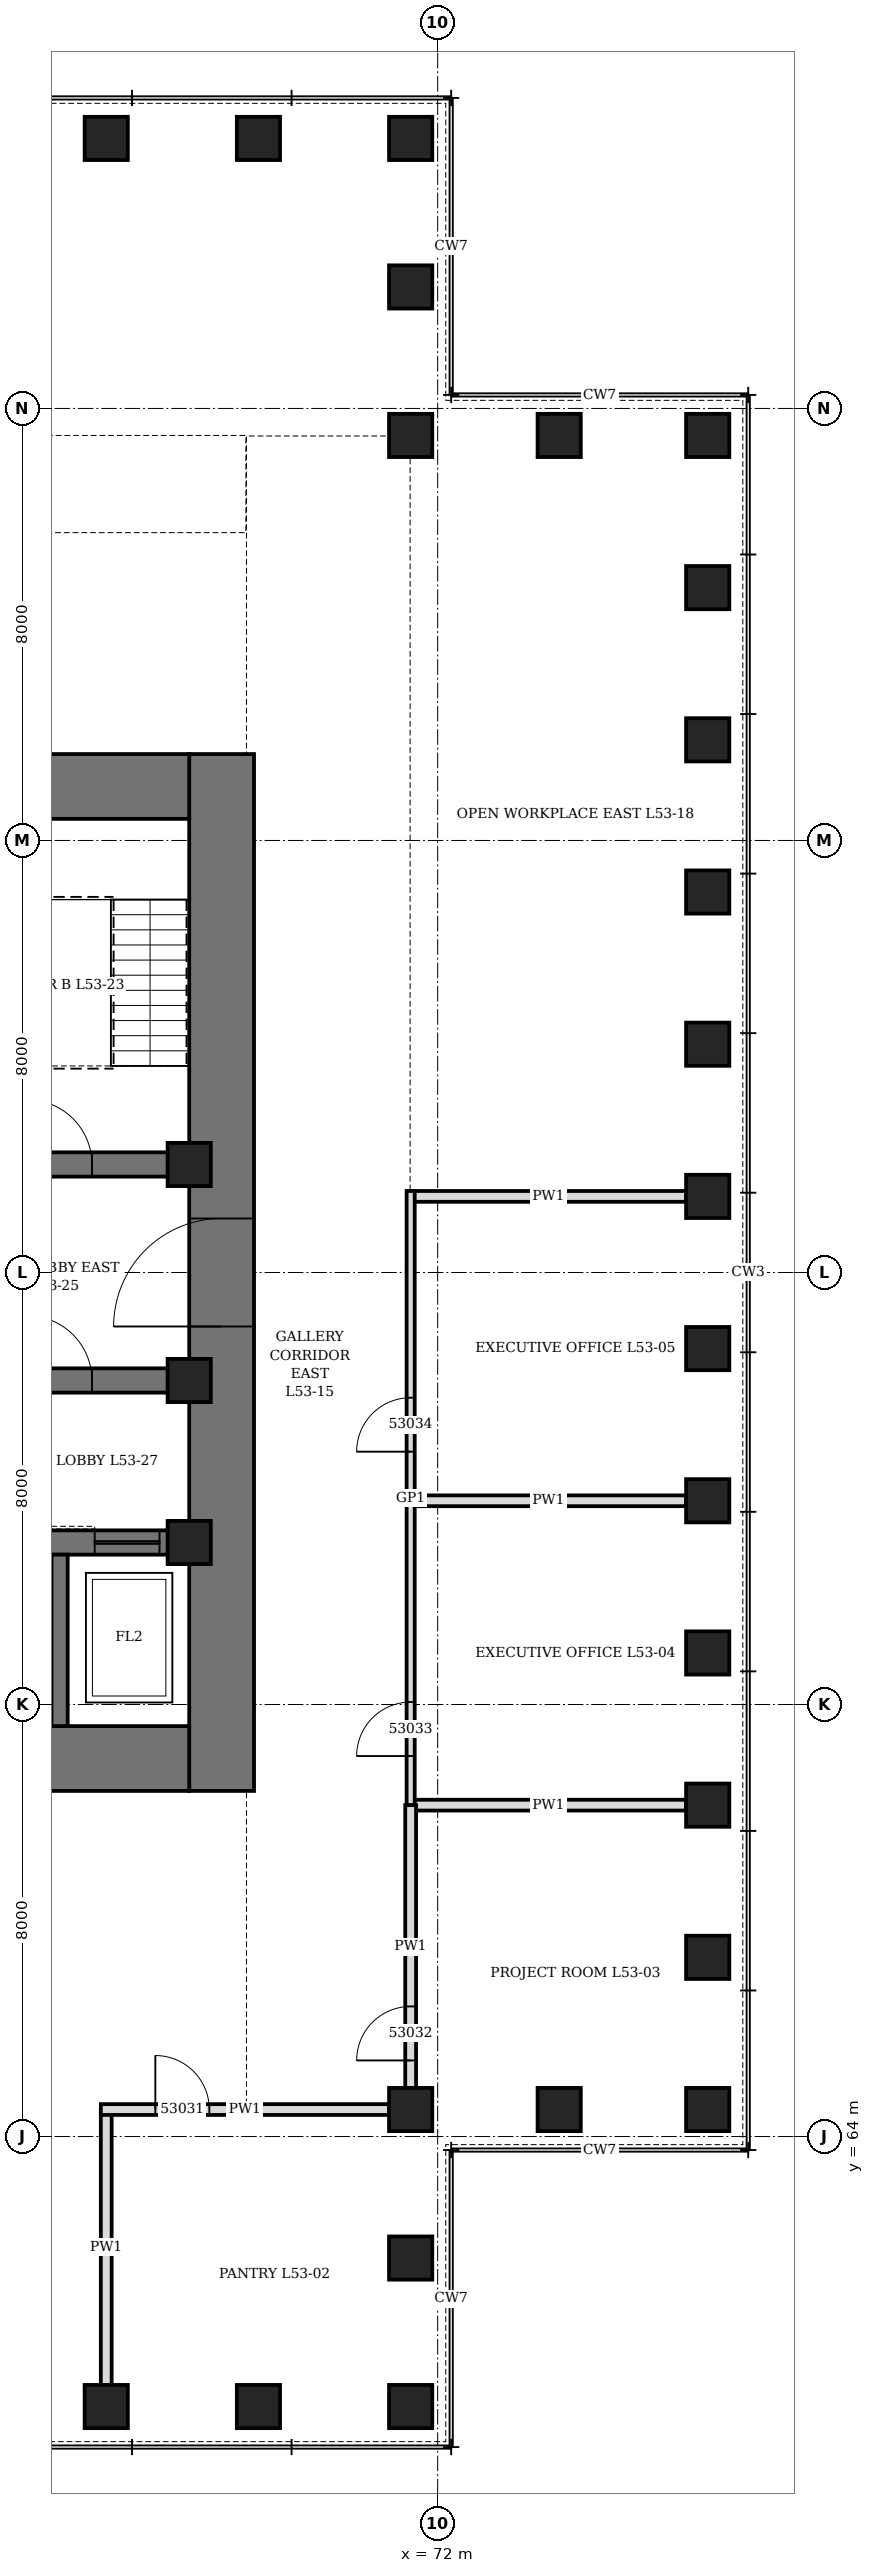
"""IFC4 building model, lengths in metres.
Left out: names, types, materials, properties, quantities, classifications, styles, units other than length and angle.
Written with IfcOpenShell. Run it as: python <this file> out.ifc"""

import sys

from ifc_helpers import new_model, si_unit, direction, frame, frame_2d, origin, origin_2d, place, context, subcontext, project, spatial, rectangle, hollow_rectangle, extrude, element, fill, save


model = new_model("IFC4")
c1 = context("Model", 3, precision=1e-05, world=origin(), true_north=direction((0.0, 1.0)))
c2 = subcontext(c1, "Body", "Model", "MODEL_VIEW")
j1 = project(units=[si_unit("LENGTHUNIT", "METRE"), si_unit("PLANEANGLEUNIT", "RADIAN")], contexts=[c1])
p1 = place(None, origin())
s1 = spatial("IfcSite", under=j1, at=p1, CompositionType="ELEMENT")
p2 = place(p1, origin())
s2 = spatial("IfcBuilding", under=s1, at=p2, CompositionType="ELEMENT")
p3 = place(p2, frame((0.0, 0.0, 235.9)))
s3 = spatial("IfcBuildingStorey", under=s2, at=p3, CompositionType="ELEMENT", Elevation=235.9)
for number, where, z_axis, x_axis in (
    (1, (65.864, 59.0, 0.0), (0.0, 0.0, 1.0), (1.0, 0.0, 0.0)),
    (2, (68.682, 59.0, 0.0), (0.0, 0.0, 1.0), (1.0, 0.0, 0.0)),
    (3, (71.5, 59.0, 0.0), (0.0, 0.0, 1.0), (0.0, 1.0, 0.0)),
    (4, (71.5, 61.75, 0.0), (0.0, 0.0, 1.0), (0.0, 1.0, 0.0)),
    (5, (71.5, 64.5, 0.0), (0.0, 0.0, 1.0), (1.0, 0.0, 0.0)),
    (6, (74.25, 64.5, 0.0), (0.0, 0.0, 1.0), (1.0, 0.0, 0.0)),
    (7, (77.0, 64.5, 0.0), (0.0, 0.0, 1.0), (0.0, 1.0, 0.0)),
    (8, (77.0, 67.318, 0.0), (0.0, 0.0, 1.0), (0.0, 1.0, 0.0)),
    (9, (77.0, 70.136, 0.0), (0.0, 0.0, 1.0), (0.0, 1.0, 0.0)),
    (10, (77.0, 72.955, 0.0), (0.0, 0.0, 1.0), (0.0, 1.0, 0.0)),
    (11, (77.0, 75.773, 0.0), (0.0, 0.0, 1.0), (0.0, 1.0, 0.0)),
    (12, (77.0, 78.591, 0.0), (0.0, 0.0, 1.0), (0.0, 1.0, 0.0)),
    (13, (77.0, 81.409, 0.0), (0.0, 0.0, 1.0), (0.0, 1.0, 0.0)),
    (14, (77.0, 84.227, 0.0), (0.0, 0.0, 1.0), (0.0, 1.0, 0.0)),
    (15, (77.0, 87.045, 0.0), (0.0, 0.0, 1.0), (0.0, 1.0, 0.0)),
    (16, (77.0, 89.864, 0.0), (0.0, 0.0, 1.0), (0.0, 1.0, 0.0)),
    (17, (77.0, 92.682, 0.0), (0.0, 0.0, 1.0), (0.0, 1.0, 0.0)),
    (18, (77.0, 95.5, 0.0), (0.0, 0.0, 1.0), (1.0, 0.0, 0.0)),
    (19, (74.25, 95.5, 0.0), (0.0, 0.0, 1.0), (1.0, 0.0, 0.0)),
    (20, (71.5, 95.5, 0.0), (0.0, 0.0, 1.0), (0.0, 1.0, 0.0)),
    (21, (71.5, 98.25, 0.0), (0.0, 0.0, 1.0), (0.0, 1.0, 0.0)),
    (22, (71.5, 101.0, 0.0), (0.0, 0.0, 1.0), (1.0, 0.0, 0.0)),
    (23, (68.682, 101.0, 0.0), (0.0, 0.0, 1.0), (1.0, 0.0, 0.0)),
    (24, (65.864, 101.0, 0.0), (0.0, 0.0, 1.0), (1.0, 0.0, 0.0)),
):
    element("IfcColumn", number, at=place(p3, frame(where, z_axis=z_axis, x_axis=x_axis)), inside=s3, PredefinedType="COLUMN", context=c2, shape_type="SweptSolid", body=[
        extrude(hollow_rectangle(XDim=0.8, YDim=0.8, WallThickness=0.08, at=origin_2d()), origin(), (0.0, 0.0, 1.0), 4.2),
    ])
p4 = place(p3, frame((68.0, 70.4, 0.0), z_axis=(0.0, 0.0, 1.0), x_axis=(0.0, 1.0, 0.0)))
e25 = element("IfcWall", 25, at=p4, inside=s3, PredefinedType="SHEAR", context=c2, shape_type="SweptSolid", body=[
    extrude(rectangle(XDim=19.2, YDim=1.2, at=frame_2d((9.6, 0.0))), origin(), (0.0, 0.0, 1.0), 4.2),
])
p5 = place(p4, frame((8.6, 0.0, 0.0)))
e26 = element("IfcOpeningElement", 26, at=p5, cuts=e25, PredefinedType="OPENING", context=c2, shape_type="SweptSolid", body=[
    extrude(rectangle(XDim=2.0, YDim=2.4, at=frame_2d((1.0, 1.2))), frame((0.0, 0.61, 0.0), z_axis=(0.0, -1.0, 0.0), x_axis=(1.0, 0.0, 0.0)), (0.0, 0.0, 1.0), 1.22),
])
p6 = place(p3, frame((44.6, 71.0, 0.0), z_axis=(0.0, 0.0, 1.0), x_axis=(1.0, 0.0, 0.0)))
e27 = element("IfcWall", 27, at=p6, inside=s3, PredefinedType="SHEAR", context=c2, shape_type="SweptSolid", body=[
    extrude(rectangle(XDim=22.8, YDim=1.2, at=frame_2d((11.4, 0.0))), origin(), (0.0, 0.0, 1.0), 4.2),
])
p7 = place(p6, frame((6.35, 0.0, 0.0)))
e28 = element("IfcOpeningElement", 28, at=p7, cuts=e27, PredefinedType="OPENING", context=c2, shape_type="SweptSolid", body=[
    extrude(rectangle(XDim=1.1, YDim=2.2, at=frame_2d((0.55, 1.1))), frame((0.0, 0.61, 0.0), z_axis=(0.0, -1.0, 0.0), x_axis=(1.0, 0.0, 0.0)), (0.0, 0.0, 1.0), 1.22),
])
p8 = place(p6, frame((9.35, 0.0, 0.0)))
e29 = element("IfcOpeningElement", 29, at=p8, cuts=e27, PredefinedType="OPENING", context=c2, shape_type="SweptSolid", body=[
    extrude(rectangle(XDim=1.1, YDim=2.2, at=frame_2d((0.55, 1.1))), frame((0.0, 0.61, 0.0), z_axis=(0.0, -1.0, 0.0), x_axis=(1.0, 0.0, 0.0)), (0.0, 0.0, 1.0), 1.22),
])
p9 = place(p6, frame((12.35, 0.0, 0.0)))
e30 = element("IfcOpeningElement", 30, at=p9, cuts=e27, PredefinedType="OPENING", context=c2, shape_type="SweptSolid", body=[
    extrude(rectangle(XDim=1.1, YDim=2.2, at=frame_2d((0.55, 1.1))), frame((0.0, 0.61, 0.0), z_axis=(0.0, -1.0, 0.0), x_axis=(1.0, 0.0, 0.0)), (0.0, 0.0, 1.0), 1.22),
])
p10 = place(p6, frame((15.35, 0.0, 0.0)))
e31 = element("IfcOpeningElement", 31, at=p10, cuts=e27, PredefinedType="OPENING", context=c2, shape_type="SweptSolid", body=[
    extrude(rectangle(XDim=1.1, YDim=2.2, at=frame_2d((0.55, 1.1))), frame((0.0, 0.61, 0.0), z_axis=(0.0, -1.0, 0.0), x_axis=(1.0, 0.0, 0.0)), (0.0, 0.0, 1.0), 1.22),
])
p11 = place(p3, frame((44.6, 89.0, 0.0), z_axis=(0.0, 0.0, 1.0), x_axis=(1.0, 0.0, 0.0)))
e32 = element("IfcWall", 32, at=p11, inside=s3, PredefinedType="SHEAR", context=c2, shape_type="SweptSolid", body=[
    extrude(rectangle(XDim=22.8, YDim=1.2, at=frame_2d((11.4, 0.0))), origin(), (0.0, 0.0, 1.0), 4.2),
])
p12 = place(p11, frame((9.275, 0.0, 0.0)))
e33 = element("IfcOpeningElement", 33, at=p12, cuts=e32, PredefinedType="OPENING", context=c2, shape_type="SweptSolid", body=[
    extrude(rectangle(XDim=1.0, YDim=2.1, at=frame_2d((0.5, 1.05))), frame((0.0, 0.61, 0.0), z_axis=(0.0, -1.0, 0.0), x_axis=(1.0, 0.0, 0.0)), (0.0, 0.0, 1.0), 1.22),
])
p13 = place(p11, frame((6.45, 0.0, 0.0)))
e34 = element("IfcOpeningElement", 34, at=p13, cuts=e32, PredefinedType="OPENING", context=c2, shape_type="SweptSolid", body=[
    extrude(rectangle(XDim=0.9, YDim=2.1, at=frame_2d((0.45, 1.05))), frame((0.0, 0.61, 0.0), z_axis=(0.0, -1.0, 0.0), x_axis=(1.0, 0.0, 0.0)), (0.0, 0.0, 1.0), 1.22),
])
p14 = place(p11, frame((12.025, 0.0, 0.0)))
e35 = element("IfcOpeningElement", 35, at=p14, cuts=e32, PredefinedType="OPENING", context=c2, shape_type="SweptSolid", body=[
    extrude(rectangle(XDim=0.9, YDim=2.1, at=frame_2d((0.45, 1.05))), frame((0.0, 0.61, 0.0), z_axis=(0.0, -1.0, 0.0), x_axis=(1.0, 0.0, 0.0)), (0.0, 0.0, 1.0), 1.22),
])
p15 = place(p11, frame((13.962, 0.0, 0.0)))
e36 = element("IfcOpeningElement", 36, at=p15, cuts=e32, PredefinedType="OPENING", context=c2, shape_type="SweptSolid", body=[
    extrude(rectangle(XDim=0.9, YDim=2.1, at=frame_2d((0.45, 1.05))), frame((0.0, 0.61, 0.0), z_axis=(0.0, -1.0, 0.0), x_axis=(1.0, 0.0, 0.0)), (0.0, 0.0, 1.0), 1.22),
])
p16 = place(p3, frame((62.225, 75.0, 0.0), z_axis=(0.0, 0.0, 1.0), x_axis=(1.0, 0.0, 0.0)))
e37 = element("IfcWall", 37, at=p16, inside=s3, PredefinedType="SHEAR", context=c2, shape_type="SweptSolid", body=[
    extrude(rectangle(XDim=5.175, YDim=0.45, at=frame_2d((2.587, 0.0))), origin(), (0.0, 0.0, 1.0), 4.2),
])
p17 = place(p16, frame((0.675, 0.0, 0.0)))
e38 = element("IfcOpeningElement", 38, at=p17, cuts=e37, PredefinedType="OPENING", context=c2, shape_type="SweptSolid", body=[
    extrude(rectangle(XDim=1.2, YDim=2.2, at=frame_2d((0.6, 1.1))), frame((0.0, 0.235, 0.0), z_axis=(0.0, -1.0, 0.0), x_axis=(1.0, 0.0, 0.0)), (0.0, 0.0, 1.0), 0.47),
])
p18 = place(p16, frame((3.425, 0.0, 0.0)))
e39 = element("IfcOpeningElement", 39, at=p18, cuts=e37, PredefinedType="OPENING", context=c2, shape_type="SweptSolid", body=[
    extrude(rectangle(XDim=1.2, YDim=2.2, at=frame_2d((0.6, 1.1))), frame((0.0, 0.235, 0.0), z_axis=(0.0, -1.0, 0.0), x_axis=(1.0, 0.0, 0.0)), (0.0, 0.0, 1.0), 0.47),
])
p19 = place(p3, frame((62.225, 78.0, 0.0), z_axis=(0.0, 0.0, 1.0), x_axis=(1.0, 0.0, 0.0)))
e40 = element("IfcWall", 40, at=p19, inside=s3, PredefinedType="SHEAR", context=c2, shape_type="SweptSolid", body=[
    extrude(rectangle(XDim=5.175, YDim=0.45, at=frame_2d((2.587, 0.0))), origin(), (0.0, 0.0, 1.0), 4.2),
])
p20 = place(p19, frame((2.175, 0.0, 0.0)))
e41 = element("IfcOpeningElement", 41, at=p20, cuts=e40, PredefinedType="OPENING", context=c2, shape_type="SweptSolid", body=[
    extrude(rectangle(XDim=1.2, YDim=2.1, at=frame_2d((0.6, 1.05))), frame((0.0, 0.235, 0.0), z_axis=(0.0, -1.0, 0.0), x_axis=(1.0, 0.0, 0.0)), (0.0, 0.0, 1.0), 0.47),
])
p21 = place(p3, frame((62.225, 82.0, 0.0), z_axis=(0.0, 0.0, 1.0), x_axis=(1.0, 0.0, 0.0)))
e42 = element("IfcWall", 42, at=p21, inside=s3, PredefinedType="SHEAR", context=c2, shape_type="SweptSolid", body=[
    extrude(rectangle(XDim=5.175, YDim=0.45, at=frame_2d((2.587, 0.0))), origin(), (0.0, 0.0, 1.0), 4.2),
])
p22 = place(p21, frame((2.175, 0.0, 0.0)))
e43 = element("IfcOpeningElement", 43, at=p22, cuts=e42, PredefinedType="OPENING", context=c2, shape_type="SweptSolid", body=[
    extrude(rectangle(XDim=1.2, YDim=2.1, at=frame_2d((0.6, 1.05))), frame((0.0, 0.235, 0.0), z_axis=(0.0, -1.0, 0.0), x_axis=(1.0, 0.0, 0.0)), (0.0, 0.0, 1.0), 0.47),
])
p23 = place(p3, frame((65.0, 71.6, 0.0), z_axis=(0.0, 0.0, 1.0), x_axis=(0.0, 1.0, 0.0)))
e44 = element("IfcWall", 44, at=p23, inside=s3, PredefinedType="SHEAR", context=c2, shape_type="SweptSolid", body=[
    extrude(rectangle(XDim=3.175, YDim=0.3, at=frame_2d((1.587, 0.0))), origin(), (0.0, 0.0, 1.0), 4.2),
])
for number, where, z_axis, x_axis in (
    (45, (67.4, 75.0, 0.0), (0.0, 0.0, 1.0), (1.0, 0.0, 0.0)),
    (46, (67.4, 78.0, 0.0), (0.0, 0.0, 1.0), (1.0, 0.0, 0.0)),
    (47, (67.4, 82.0, 0.0), (0.0, 0.0, 1.0), (1.0, 0.0, 0.0)),
):
    element("IfcColumn", number, at=place(p3, frame(where, z_axis=z_axis, x_axis=x_axis)), inside=s3, PredefinedType="COLUMN", context=c2, shape_type="SweptSolid", body=[
        extrude(hollow_rectangle(XDim=0.8, YDim=0.8, WallThickness=0.1, at=origin_2d()), origin(), (0.0, 0.0, 1.0), 4.2),
    ])
for number, where, z_axis, x_axis in (
    (48, (65.864, 59.4, 0.0), (0.0, 0.0, 1.0), (0.0, 1.0, 0.0)),
    (49, (71.5, 70.136, 0.0), (0.0, 0.0, 1.0), (1.0, 0.0, 0.0)),
    (50, (71.5, 75.773, 0.0), (0.0, 0.0, 1.0), (1.0, 0.0, 0.0)),
    (51, (71.5, 81.409, 0.0), (0.0, 0.0, 1.0), (1.0, 0.0, 0.0)),
):
    element("IfcWall", number, at=place(p3, frame(where, z_axis=z_axis, x_axis=x_axis)), inside=s3, PredefinedType="PARTITIONING", context=c2, shape_type="SweptSolid", body=[
        extrude(rectangle(XDim=5.1, YDim=0.2, at=frame_2d((2.55, 0.0))), origin(), (0.0, 0.0, 1.0), 3.428),
    ])
p24 = place(p3, frame((65.764, 64.5, 0.0), z_axis=(0.0, 0.0, 1.0), x_axis=(1.0, 0.0, 0.0)))
e52 = element("IfcWall", 52, at=p24, inside=s3, PredefinedType="PARTITIONING", context=c2, shape_type="SweptSolid", body=[
    extrude(rectangle(XDim=5.336, YDim=0.2, at=frame_2d((2.668, 0.0))), origin(), (0.0, 0.0, 1.0), 4.04),
])
p25 = place(p24, frame((1.009, 0.0, 0.0)))
e53 = element("IfcOpeningElement", 53, at=p25, cuts=e52, PredefinedType="OPENING", context=c2, shape_type="SweptSolid", body=[
    extrude(rectangle(XDim=1.0, YDim=2.1, at=frame_2d((0.5, 1.05))), frame((0.0, 0.11, 0.0), z_axis=(0.0, -1.0, 0.0), x_axis=(1.0, 0.0, 0.0)), (0.0, 0.0, 1.0), 0.22),
])
p26 = place(p3, frame((71.5, 70.136, 0.0), z_axis=(0.0, 0.0, 1.0), x_axis=(0.0, 1.0, 0.0)))
e54 = element("IfcWall", 54, at=p26, inside=s3, PredefinedType="PARTITIONING", context=c2, shape_type="SweptSolid", body=[
    extrude(rectangle(XDim=11.373, YDim=0.15, at=frame_2d((5.686, 0.0))), origin(), (0.0, 0.0, 1.0), 4.04),
])
p27 = place(p26, frame((0.909, 0.0, 0.0)))
e55 = element("IfcOpeningElement", 55, at=p27, cuts=e54, PredefinedType="OPENING", context=c2, shape_type="SweptSolid", body=[
    extrude(rectangle(XDim=1.0, YDim=2.1, at=frame_2d((0.5, 1.05))), frame((0.0, 0.085, 0.0), z_axis=(0.0, -1.0, 0.0), x_axis=(1.0, 0.0, 0.0)), (0.0, 0.0, 1.0), 0.17),
])
p28 = place(p26, frame((6.545, 0.0, 0.0)))
e56 = element("IfcOpeningElement", 56, at=p28, cuts=e54, PredefinedType="OPENING", context=c2, shape_type="SweptSolid", body=[
    extrude(rectangle(XDim=1.0, YDim=2.1, at=frame_2d((0.5, 1.05))), frame((0.0, 0.085, 0.0), z_axis=(0.0, -1.0, 0.0), x_axis=(1.0, 0.0, 0.0)), (0.0, 0.0, 1.0), 0.17),
])
p29 = place(p3, frame((71.5, 64.9, 0.0), z_axis=(0.0, 0.0, 1.0), x_axis=(0.0, 1.0, 0.0)))
e57 = element("IfcWall", 57, at=p29, inside=s3, PredefinedType="PARTITIONING", context=c2, shape_type="SweptSolid", body=[
    extrude(rectangle(XDim=5.237, YDim=0.2, at=frame_2d((2.618, 0.0))), origin(), (0.0, 0.0, 1.0), 4.04),
])
p30 = place(p29, frame((0.509, 0.0, 0.0)))
e58 = element("IfcOpeningElement", 58, at=p30, cuts=e57, PredefinedType="OPENING", context=c2, shape_type="SweptSolid", body=[
    extrude(rectangle(XDim=1.0, YDim=2.1, at=frame_2d((0.5, 1.05))), frame((0.0, 0.11, 0.0), z_axis=(0.0, -1.0, 0.0), x_axis=(1.0, 0.0, 0.0)), (0.0, 0.0, 1.0), 0.22),
])
p31 = place(p22, origin())
e59 = element("IfcDoor", 59, at=p31, inside=s3, OperationType="SINGLE_SWING_LEFT", PredefinedType="DOOR", context=c2, shape_type="SweptSolid", body=[
    extrude(rectangle(XDim=1.2, YDim=2.1, at=frame_2d((0.6, 1.05))), frame((0.0, 0.225, 0.0), z_axis=(0.0, -1.0, 0.0), x_axis=(1.0, 0.0, 0.0)), (0.0, 0.0, 1.0), 0.449),
])
fill(e43, e59)
p32 = place(p5, origin())
e60 = element("IfcDoor", 60, at=p32, inside=s3, OperationType="DOUBLE_DOOR_SINGLE_SWING", PredefinedType="DOOR", context=c2, shape_type="SweptSolid", body=[
    extrude(rectangle(XDim=2.0, YDim=2.4, at=frame_2d((1.0, 1.2))), frame((0.0, 0.35, 0.0), z_axis=(0.0, -1.0, 0.0), x_axis=(1.0, 0.0, 0.0)), (0.0, 0.0, 1.0), 0.7),
])
fill(e26, e60)
p33 = place(p20, origin())
e61 = element("IfcDoor", 61, at=p33, inside=s3, OperationType="SINGLE_SWING_RIGHT", PredefinedType="DOOR", context=c2, shape_type="SweptSolid", body=[
    extrude(rectangle(XDim=1.2, YDim=2.1, at=frame_2d((0.6, 1.05))), frame((0.0, 0.225, 0.0), z_axis=(0.0, -1.0, 0.0), x_axis=(1.0, 0.0, 0.0)), (0.0, 0.0, 1.0), 0.449),
])
fill(e41, e61)
p34 = place(p18, origin())
e62 = element("IfcDoor", 62, at=p34, inside=s3, OperationType="SLIDING_TO_LEFT", PredefinedType="DOOR", context=c2, shape_type="SweptSolid", body=[
    extrude(rectangle(XDim=1.2, YDim=2.2, at=frame_2d((0.6, 1.1))), frame((0.0, 0.225, 0.0), z_axis=(0.0, -1.0, 0.0), x_axis=(1.0, 0.0, 0.0)), (0.0, 0.0, 1.0), 0.449),
])
fill(e39, e62)
p35 = place(p25, origin())
e63 = element("IfcDoor", 63, at=p35, inside=s3, OperationType="SINGLE_SWING_LEFT", PredefinedType="DOOR", context=c2, shape_type="SweptSolid", body=[
    extrude(rectangle(XDim=1.0, YDim=2.1, at=frame_2d((0.5, 1.05))), frame((0.0, 0.1, 0.0), z_axis=(0.0, -1.0, 0.0), x_axis=(1.0, 0.0, 0.0)), (0.0, 0.0, 1.0), 0.199),
])
fill(e53, e63)
p36 = place(p30, origin())
e64 = element("IfcDoor", 64, at=p36, inside=s3, OperationType="SINGLE_SWING_LEFT", PredefinedType="DOOR", context=c2, shape_type="SweptSolid", body=[
    extrude(rectangle(XDim=1.0, YDim=2.1, at=frame_2d((0.5, 1.05))), frame((0.0, 0.1, 0.0), z_axis=(0.0, -1.0, 0.0), x_axis=(1.0, 0.0, 0.0)), (0.0, 0.0, 1.0), 0.199),
])
fill(e58, e64)
p37 = place(p27, origin())
e65 = element("IfcDoor", 65, at=p37, inside=s3, OperationType="SINGLE_SWING_LEFT", PredefinedType="DOOR", context=c2, shape_type="SweptSolid", body=[
    extrude(rectangle(XDim=1.0, YDim=2.1, at=frame_2d((0.5, 1.05))), frame((0.0, 0.075, 0.0), z_axis=(0.0, -1.0, 0.0), x_axis=(1.0, 0.0, 0.0)), (0.0, 0.0, 1.0), 0.149),
])
fill(e55, e65)
p38 = place(p28, origin())
e66 = element("IfcDoor", 66, at=p38, inside=s3, OperationType="SINGLE_SWING_LEFT", PredefinedType="DOOR", context=c2, shape_type="SweptSolid", body=[
    extrude(rectangle(XDim=1.0, YDim=2.1, at=frame_2d((0.5, 1.05))), frame((0.0, 0.075, 0.0), z_axis=(0.0, -1.0, 0.0), x_axis=(1.0, 0.0, 0.0)), (0.0, 0.0, 1.0), 0.149),
])
fill(e56, e66)
save(model, sys.argv[1])
